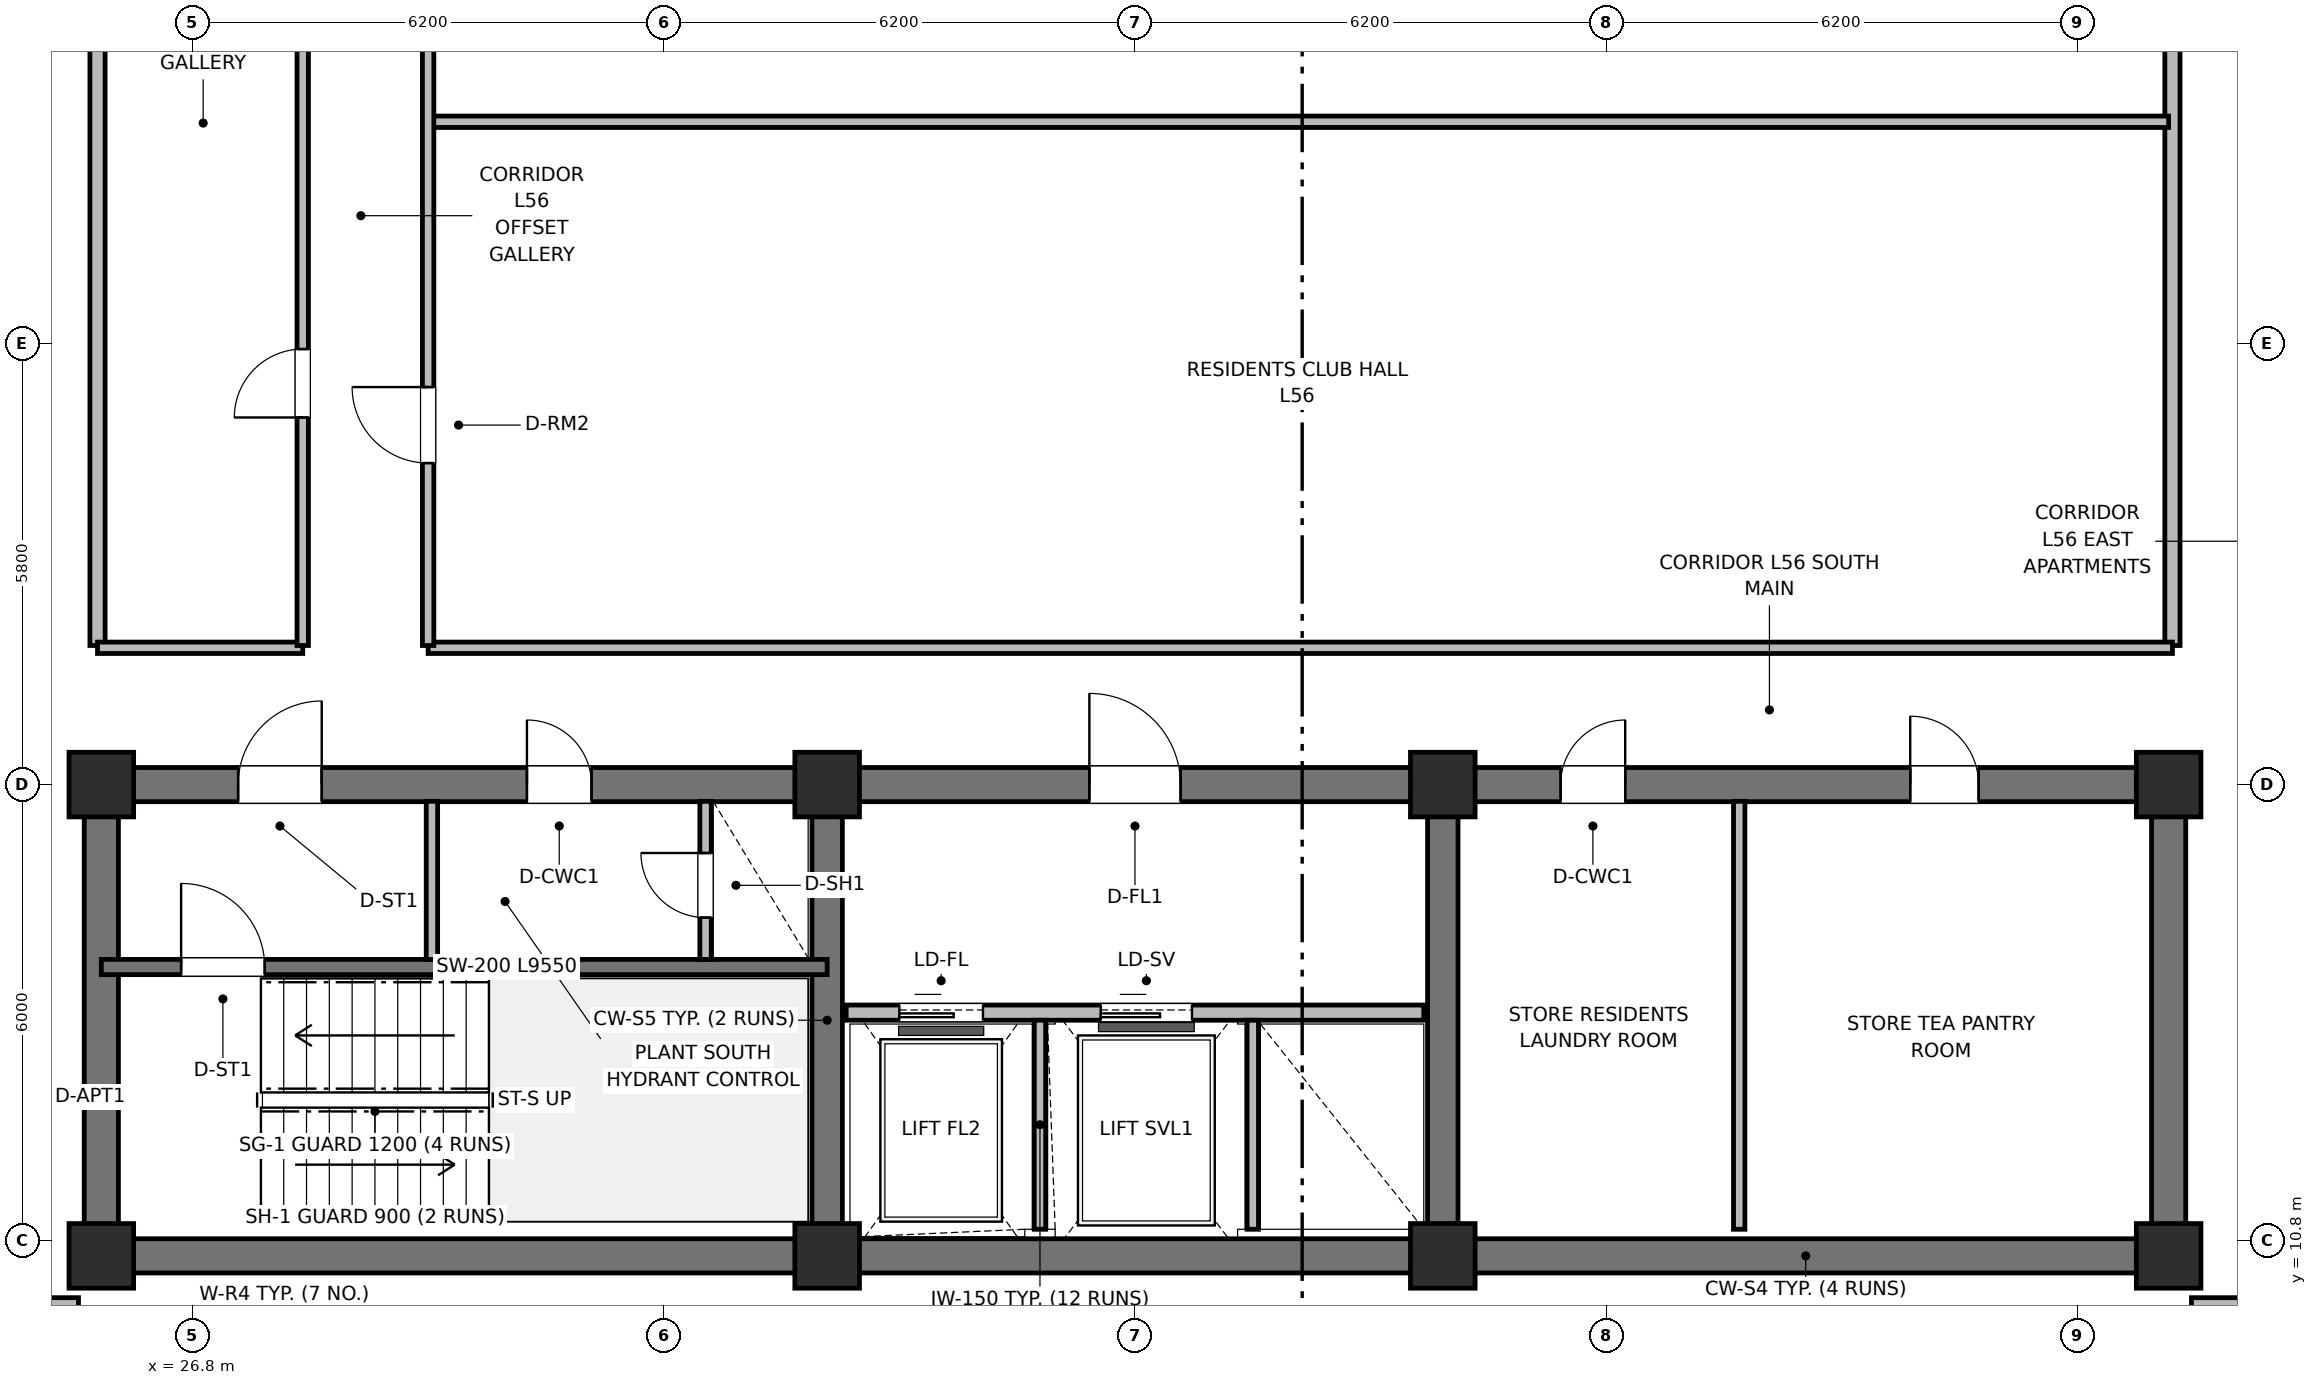
"""IFC4 building model, lengths in metres.
Left out: names, types, materials, properties, quantities, classifications, styles, units other than length and angle.
Written with IfcOpenShell. Run it as: python <this file> out.ifc"""

import sys

from ifc_helpers import new_model, si_unit, direction, frame, frame_2d, origin, origin_2d, place, context, subcontext, project, spatial, rectangle, extrude, element, fill, save


model = new_model("IFC4")
c1 = context("Model", 3, precision=1e-05, world=origin(), true_north=direction((0.0, 1.0)))
c2 = subcontext(c1, "Body", "Model", "MODEL_VIEW")
j1 = project(units=[si_unit("LENGTHUNIT", "METRE"), si_unit("PLANEANGLEUNIT", "RADIAN")], contexts=[c1])
p1 = place(None, origin())
s1 = spatial("IfcSite", under=j1, at=p1, CompositionType="ELEMENT")
p2 = place(p1, origin())
s2 = spatial("IfcBuilding", under=s1, at=p2, CompositionType="ELEMENT")
p3 = place(p2, frame((0.0, 0.0, 225.8)))
s3 = spatial("IfcBuildingStorey", under=s2, at=p3, CompositionType="ELEMENT", Elevation=225.8)
p4 = place(p3, frame((52.8, 10.6, 0.0), z_axis=(0.0, 0.0, 1.0), x_axis=(-1.0, 0.0, 0.0)))
e1 = element("IfcWall", 1, at=p4, inside=s3, PredefinedType="SHEAR", context=c2, shape_type="SweptSolid", body=[
    extrude(rectangle(XDim=27.2, YDim=0.45, at=frame_2d((13.6, 0.0))), origin(), (0.0, 0.0, 1.0), 3.7),
])
for number, where, z_axis, x_axis in (
    (2, (25.6, 10.825, 0.0), (0.0, 0.0, 1.0), (0.0, 1.0, 0.0)),
    (3, (52.8, 10.825, 0.0), (0.0, 0.0, 1.0), (0.0, 1.0, 0.0)),
):
    element("IfcWall", number, at=place(p3, frame(where, z_axis=z_axis, x_axis=x_axis)), inside=s3, PredefinedType="SHEAR", context=c2, shape_type="SweptSolid", body=[
        extrude(rectangle(XDim=5.75, YDim=0.45, at=frame_2d((2.875, 0.0))), origin(), (0.0, 0.0, 1.0), 3.7),
    ])
p5 = place(p3, frame((25.6, 16.8, 0.0), z_axis=(0.0, 0.0, 1.0), x_axis=(1.0, 0.0, 0.0)))
e4 = element("IfcWall", 4, at=p5, inside=s3, PredefinedType="SHEAR", context=c2, shape_type="SweptSolid", body=[
    extrude(rectangle(XDim=27.2, YDim=0.45, at=frame_2d((13.6, 0.0))), origin(), (0.0, 0.0, 1.0), 3.7),
])
p6 = place(p5, frame((1.8, 0.0, 0.0)))
e5 = element("IfcOpeningElement", 5, at=p6, cuts=e4, PredefinedType="OPENING", context=c2, shape_type="SweptSolid", body=[
    extrude(rectangle(XDim=1.1, YDim=2.15, at=frame_2d((0.55, 1.075))), frame((0.0, 0.235, 0.0), z_axis=(0.0, -1.0, 0.0), x_axis=(1.0, 0.0, 0.0)), (0.0, 0.0, 1.0), 0.47),
])
p7 = place(p5, frame((5.6, 0.0, 0.0)))
e6 = element("IfcOpeningElement", 6, at=p7, cuts=e4, PredefinedType="OPENING", context=c2, shape_type="SweptSolid", body=[
    extrude(rectangle(XDim=0.85, YDim=2.1, at=frame_2d((0.425, 1.05))), frame((0.0, 0.235, 0.0), z_axis=(0.0, -1.0, 0.0), x_axis=(1.0, 0.0, 0.0)), (0.0, 0.0, 1.0), 0.47),
])
p8 = place(p5, frame((13.0, 0.0, 0.0)))
e7 = element("IfcOpeningElement", 7, at=p8, cuts=e4, PredefinedType="OPENING", context=c2, shape_type="SweptSolid", body=[
    extrude(rectangle(XDim=1.2, YDim=2.15, at=frame_2d((0.6, 1.075))), frame((0.0, 0.235, 0.0), z_axis=(0.0, -1.0, 0.0), x_axis=(1.0, 0.0, 0.0)), (0.0, 0.0, 1.0), 0.47),
])
p9 = place(p5, frame((19.2, 0.0, 0.0)))
e8 = element("IfcOpeningElement", 8, at=p9, cuts=e4, PredefinedType="OPENING", context=c2, shape_type="SweptSolid", body=[
    extrude(rectangle(XDim=0.85, YDim=2.1, at=frame_2d((0.425, 1.05))), frame((0.0, 0.235, 0.0), z_axis=(0.0, -1.0, 0.0), x_axis=(1.0, 0.0, 0.0)), (0.0, 0.0, 1.0), 0.47),
])
p10 = place(p5, frame((23.8, 0.0, 0.0)))
e9 = element("IfcOpeningElement", 9, at=p10, cuts=e4, PredefinedType="OPENING", context=c2, shape_type="SweptSolid", body=[
    extrude(rectangle(XDim=0.9, YDim=2.1, at=frame_2d((0.45, 1.05))), frame((0.0, 0.235, 0.0), z_axis=(0.0, -1.0, 0.0), x_axis=(1.0, 0.0, 0.0)), (0.0, 0.0, 1.0), 0.47),
])
for number, where, z_axis, x_axis in (
    (10, (35.15, 10.825, 0.0), (0.0, 0.0, 1.0), (0.0, 1.0, 0.0)),
    (11, (43.25, 10.825, 0.0), (0.0, 0.0, 1.0), (0.0, 1.0, 0.0)),
):
    element("IfcWall", number, at=place(p3, frame(where, z_axis=z_axis, x_axis=x_axis)), inside=s3, PredefinedType="SHEAR", context=c2, shape_type="SweptSolid", body=[
        extrude(rectangle(XDim=5.75, YDim=0.4, at=frame_2d((2.875, 0.0))), origin(), (0.0, 0.0, 1.0), 3.7),
    ])
for number, where, z_axis, x_axis in (
    (12, (25.6, 10.6, 0.0), (0.0, 0.0, 1.0), (1.0, 0.0, 0.0)),
    (13, (25.6, 16.8, 0.0), (0.0, 0.0, 1.0), (1.0, 0.0, 0.0)),
    (14, (35.15, 10.6, 0.0), (0.0, 0.0, 1.0), (1.0, 0.0, 0.0)),
    (15, (35.15, 16.8, 0.0), (0.0, 0.0, 1.0), (1.0, 0.0, 0.0)),
    (16, (43.25, 10.6, 0.0), (0.0, 0.0, 1.0), (1.0, 0.0, 0.0)),
    (17, (43.25, 16.8, 0.0), (0.0, 0.0, 1.0), (1.0, 0.0, 0.0)),
    (18, (52.8, 10.6, 0.0), (0.0, 0.0, 1.0), (1.0, 0.0, 0.0)),
    (19, (52.8, 16.8, 0.0), (0.0, 0.0, 1.0), (1.0, 0.0, 0.0)),
):
    element("IfcColumn", number, at=place(p3, frame(where, z_axis=z_axis, x_axis=x_axis)), inside=s3, PredefinedType="COLUMN", context=c2, shape_type="SweptSolid", body=[
        extrude(rectangle(XDim=0.85, YDim=0.85, at=origin_2d()), origin(), (0.0, 0.0, 1.0), 3.7),
    ])
p11 = place(p3, frame((25.6, 14.4, 0.0), z_axis=(0.0, 0.0, 1.0), x_axis=(1.0, 0.0, 0.0)))
e20 = element("IfcWall", 20, at=p11, inside=s3, PredefinedType="SHEAR", context=c2, shape_type="SweptSolid", body=[
    extrude(rectangle(XDim=9.55, YDim=0.2, at=frame_2d((4.775, 0.0))), origin(), (0.0, 0.0, 1.0), 3.7),
])
p12 = place(p11, frame((1.05, 0.0, 0.0)))
e21 = element("IfcOpeningElement", 21, at=p12, cuts=e20, PredefinedType="OPENING", context=c2, shape_type="SweptSolid", body=[
    extrude(rectangle(XDim=1.1, YDim=2.15, at=frame_2d((0.55, 1.075))), frame((0.0, 0.11, 0.0), z_axis=(0.0, -1.0, 0.0), x_axis=(1.0, 0.0, 0.0)), (0.0, 0.0, 1.0), 0.22),
])
p13 = place(p3, frame((29.95, 14.5, 0.0), z_axis=(0.0, 0.0, 1.0), x_axis=(0.0, 1.0, 0.0)))
e22 = element("IfcWall", 22, at=p13, inside=s3, PredefinedType="PARTITIONING", context=c2, shape_type="SweptSolid", body=[
    extrude(rectangle(XDim=2.08, YDim=0.15, at=frame_2d((1.04, 0.0))), origin(), (0.0, 0.0, 1.0), 2.56),
])
p14 = place(p3, frame((33.55, 14.5, 0.0), z_axis=(0.0, 0.0, 1.0), x_axis=(0.0, 1.0, 0.0)))
e23 = element("IfcWall", 23, at=p14, inside=s3, PredefinedType="PARTITIONING", context=c2, shape_type="SweptSolid", body=[
    extrude(rectangle(XDim=2.08, YDim=0.15, at=frame_2d((1.04, 0.0))), origin(), (0.0, 0.0, 1.0), 2.56),
])
p15 = place(p14, frame((0.55, 0.0, 0.0)))
e24 = element("IfcOpeningElement", 24, at=p15, cuts=e23, PredefinedType="OPENING", context=c2, shape_type="SweptSolid", body=[
    extrude(rectangle(XDim=0.85, YDim=2.05, at=frame_2d((0.425, 1.025))), frame((0.0, 0.085, 0.0), z_axis=(0.0, -1.0, 0.0), x_axis=(1.0, 0.0, 0.0)), (0.0, 0.0, 1.0), 0.17),
])
p16 = place(p3, frame((35.4, 13.8, 0.0), z_axis=(0.0, 0.0, 1.0), x_axis=(1.0, 0.0, 0.0)))
e25 = element("IfcWall", 25, at=p16, inside=s3, PredefinedType="PARTITIONING", context=c2, shape_type="SweptSolid", body=[
    extrude(rectangle(XDim=7.6, YDim=0.2, at=frame_2d((3.8, 0.0))), origin(), (0.0, 0.0, 1.0), 2.33),
])
p17 = place(p16, frame((0.7, 0.0, 0.0)))
e26 = element("IfcOpeningElement", 26, at=p17, cuts=e25, PredefinedType="OPENING", context=c2, shape_type="SweptSolid", body=[
    extrude(rectangle(XDim=1.1, YDim=2.15, at=frame_2d((0.55, 1.075))), frame((0.0, 0.11, 0.0), z_axis=(0.0, -1.0, 0.0), x_axis=(1.0, 0.0, 0.0)), (0.0, 0.0, 1.0), 0.22),
])
p18 = place(p16, frame((3.35, 0.0, 0.0)))
e27 = element("IfcOpeningElement", 27, at=p18, cuts=e25, PredefinedType="OPENING", context=c2, shape_type="SweptSolid", body=[
    extrude(rectangle(XDim=1.2, YDim=2.15, at=frame_2d((0.6, 1.075))), frame((0.0, 0.11, 0.0), z_axis=(0.0, -1.0, 0.0), x_axis=(1.0, 0.0, 0.0)), (0.0, 0.0, 1.0), 0.22),
])
for number, where, z_axis, x_axis in (
    (28, (37.95, 10.95, 0.0), (0.0, 0.0, 1.0), (0.0, 1.0, 0.0)),
    (29, (40.75, 10.95, 0.0), (0.0, 0.0, 1.0), (0.0, 1.0, 0.0)),
):
    element("IfcWall", number, at=place(p3, frame(where, z_axis=z_axis, x_axis=x_axis)), inside=s3, PredefinedType="PARTITIONING", context=c2, shape_type="SweptSolid", body=[
        extrude(rectangle(XDim=2.75, YDim=0.15, at=frame_2d((1.375, 0.0))), origin(), (0.0, 0.0, 1.0), 2.56),
    ])
p19 = place(p3, frame((47.15, 10.95, 0.0), z_axis=(0.0, 0.0, 1.0), x_axis=(0.0, 1.0, 0.0)))
e30 = element("IfcWall", 30, at=p19, inside=s3, PredefinedType="PARTITIONING", context=c2, shape_type="SweptSolid", body=[
    extrude(rectangle(XDim=5.63, YDim=0.15, at=frame_2d((2.815, 0.0))), origin(), (0.0, 0.0, 1.0), 2.56),
])
for number, where, z_axis, x_axis in (
    (31, (25.55, 18.63, 0.0), (0.0, 0.0, 1.0), (0.0, 1.0, 0.0)),
    (32, (52.85, 18.63, 0.0), (0.0, 0.0, 1.0), (0.0, 1.0, 0.0)),
):
    element("IfcWall", number, at=place(p3, frame(where, z_axis=z_axis, x_axis=x_axis)), inside=s3, PredefinedType="PARTITIONING", context=c2, shape_type="SweptSolid", body=[
        extrude(rectangle(XDim=19.14, YDim=0.2, at=frame_2d((9.57, 0.0))), origin(), (0.0, 0.0, 1.0), 2.56),
    ])
p20 = place(p3, frame((25.55, 18.6, 0.0), z_axis=(0.0, 0.0, 1.0), x_axis=(1.0, 0.0, 0.0)))
e33 = element("IfcWall", 33, at=p20, inside=s3, PredefinedType="PARTITIONING", context=c2, shape_type="SweptSolid", body=[
    extrude(rectangle(XDim=2.7, YDim=0.15, at=frame_2d((1.35, 0.0))), origin(), (0.0, 0.0, 1.0), 2.56),
])
p21 = place(p3, frame((29.9, 18.6, 0.0), z_axis=(0.0, 0.0, 1.0), x_axis=(1.0, 0.0, 0.0)))
e34 = element("IfcWall", 34, at=p21, inside=s3, PredefinedType="PARTITIONING", context=c2, shape_type="SweptSolid", body=[
    extrude(rectangle(XDim=22.95, YDim=0.15, at=frame_2d((11.475, 0.0))), origin(), (0.0, 0.0, 1.0), 2.56),
])
p22 = place(p3, frame((29.93, 25.521, 0.0), z_axis=(0.0, 0.0, 1.0), x_axis=(1.0, 0.0, 0.0)))
e35 = element("IfcWall", 35, at=p22, inside=s3, PredefinedType="PARTITIONING", context=c2, shape_type="SweptSolid", body=[
    extrude(rectangle(XDim=22.87, YDim=0.15, at=frame_2d((11.435, 0.0))), origin(), (0.0, 0.0, 1.0), 2.56),
])
p23 = place(p3, frame((28.25, 18.63, 0.0), z_axis=(0.0, 0.0, 1.0), x_axis=(0.0, 1.0, 0.0)))
e36 = element("IfcWall", 36, at=p23, inside=s3, PredefinedType="PARTITIONING", context=c2, shape_type="SweptSolid", body=[
    extrude(rectangle(XDim=19.14, YDim=0.15, at=frame_2d((9.57, 0.0))), origin(), (0.0, 0.0, 1.0), 2.56),
])
p24 = place(p23, frame((3.0, 0.0, 0.0)))
e37 = element("IfcOpeningElement", 37, at=p24, cuts=e36, PredefinedType="OPENING", context=c2, shape_type="SweptSolid", body=[
    extrude(rectangle(XDim=0.9, YDim=2.1, at=frame_2d((0.45, 1.05))), frame((0.0, 0.085, 0.0), z_axis=(0.0, -1.0, 0.0), x_axis=(1.0, 0.0, 0.0)), (0.0, 0.0, 1.0), 0.17),
])
p25 = place(p23, frame((11.5, 0.0, 0.0)))
e38 = element("IfcOpeningElement", 38, at=p25, cuts=e36, PredefinedType="OPENING", context=c2, shape_type="SweptSolid", body=[
    extrude(rectangle(XDim=0.9, YDim=2.1, at=frame_2d((0.45, 1.05))), frame((0.0, 0.085, 0.0), z_axis=(0.0, -1.0, 0.0), x_axis=(1.0, 0.0, 0.0)), (0.0, 0.0, 1.0), 0.17),
])
p26 = place(p3, frame((29.9, 18.63, 0.0), z_axis=(0.0, 0.0, 1.0), x_axis=(0.0, 1.0, 0.0)))
e39 = element("IfcWall", 39, at=p26, inside=s3, PredefinedType="PARTITIONING", context=c2, shape_type="SweptSolid", body=[
    extrude(rectangle(XDim=19.14, YDim=0.15, at=frame_2d((9.57, 0.0))), origin(), (0.0, 0.0, 1.0), 2.56),
])
p27 = place(p26, frame((2.4, 0.0, 0.0)))
e40 = element("IfcOpeningElement", 40, at=p27, cuts=e39, PredefinedType="OPENING", context=c2, shape_type="SweptSolid", body=[
    extrude(rectangle(XDim=1.0, YDim=2.15, at=frame_2d((0.5, 1.075))), frame((0.0, 0.085, 0.0), z_axis=(0.0, -1.0, 0.0), x_axis=(1.0, 0.0, 0.0)), (0.0, 0.0, 1.0), 0.17),
])
p28 = place(p26, frame((8.89, 0.0, 0.0)))
e41 = element("IfcOpeningElement", 41, at=p28, cuts=e39, PredefinedType="OPENING", context=c2, shape_type="SweptSolid", body=[
    extrude(rectangle(XDim=1.0, YDim=2.15, at=frame_2d((0.5, 1.075))), frame((0.0, 0.085, 0.0), z_axis=(0.0, -1.0, 0.0), x_axis=(1.0, 0.0, 0.0)), (0.0, 0.0, 1.0), 0.17),
])
p29 = place(p3, frame((21.546, 9.95, 0.0), z_axis=(0.0, 0.0, 1.0), x_axis=(1.0, 0.0, 0.0)))
e42 = element("IfcWall", 42, at=p29, inside=s3, PredefinedType="PARTITIONING", context=c2, shape_type="SweptSolid", body=[
    extrude(rectangle(XDim=3.754, YDim=0.2, at=frame_2d((1.877, 0.0))), origin(), (0.0, 0.0, 1.0), 2.56),
])
p30 = place(p3, frame((53.1, 9.95, 0.0), z_axis=(0.0, 0.0, 1.0), x_axis=(1.0, 0.0, 0.0)))
e43 = element("IfcWall", 43, at=p30, inside=s3, PredefinedType="PARTITIONING", context=c2, shape_type="SweptSolid", body=[
    extrude(rectangle(XDim=3.754, YDim=0.2, at=frame_2d((1.877, 0.0))), origin(), (0.0, 0.0, 1.0), 2.56),
])
p31 = place(p12, origin())
e44 = element("IfcDoor", 44, at=p31, inside=s3, OperationType="SINGLE_SWING_LEFT", PredefinedType="DOOR", context=c2, shape_type="SweptSolid", body=[
    extrude(rectangle(XDim=1.1, YDim=2.15, at=frame_2d((0.55, 1.075))), frame((0.0, 0.025, 0.0), z_axis=(0.0, -1.0, 0.0), x_axis=(1.0, 0.0, 0.0)), (0.0, 0.0, 1.0), 0.05),
])
fill(e21, e44)
p32 = place(p15, origin())
e45 = element("IfcDoor", 45, at=p32, inside=s3, OperationType="SINGLE_SWING_RIGHT", PredefinedType="TRAPDOOR", context=c2, shape_type="SweptSolid", body=[
    extrude(rectangle(XDim=0.85, YDim=2.05, at=frame_2d((0.425, 1.025))), frame((0.0, 0.025, 0.0), z_axis=(0.0, -1.0, 0.0), x_axis=(1.0, 0.0, 0.0)), (0.0, 0.0, 1.0), 0.05),
])
fill(e24, e45)
p33 = place(p17, origin())
e46 = element("IfcDoor", 46, at=p33, inside=s3, OperationType="SLIDING_TO_LEFT", PredefinedType="DOOR", context=c2, shape_type="SweptSolid", body=[
    extrude(rectangle(XDim=1.1, YDim=2.15, at=frame_2d((0.55, 1.075))), frame((0.0, 0.025, 0.0), z_axis=(0.0, -1.0, 0.0), x_axis=(1.0, 0.0, 0.0)), (0.0, 0.0, 1.0), 0.05),
])
fill(e26, e46)
p34 = place(p18, origin())
e47 = element("IfcDoor", 47, at=p34, inside=s3, OperationType="SLIDING_TO_LEFT", PredefinedType="DOOR", context=c2, shape_type="SweptSolid", body=[
    extrude(rectangle(XDim=1.2, YDim=2.15, at=frame_2d((0.6, 1.075))), frame((0.0, 0.025, 0.0), z_axis=(0.0, -1.0, 0.0), x_axis=(1.0, 0.0, 0.0)), (0.0, 0.0, 1.0), 0.05),
])
fill(e27, e47)
p35 = place(p24, origin())
e48 = element("IfcDoor", 48, at=p35, inside=s3, OperationType="SINGLE_SWING_LEFT", PredefinedType="DOOR", context=c2, shape_type="SweptSolid", body=[
    extrude(rectangle(XDim=0.9, YDim=2.1, at=frame_2d((0.45, 1.05))), frame((0.0, 0.025, 0.0), z_axis=(0.0, -1.0, 0.0), x_axis=(1.0, 0.0, 0.0)), (0.0, 0.0, 1.0), 0.05),
])
fill(e37, e48)
p36 = place(p27, origin())
e49 = element("IfcDoor", 49, at=p36, inside=s3, OperationType="SINGLE_SWING_RIGHT", PredefinedType="DOOR", context=c2, shape_type="SweptSolid", body=[
    extrude(rectangle(XDim=1.0, YDim=2.15, at=frame_2d((0.5, 1.075))), frame((0.0, 0.025, 0.0), z_axis=(0.0, -1.0, 0.0), x_axis=(1.0, 0.0, 0.0)), (0.0, 0.0, 1.0), 0.05),
])
fill(e40, e49)
p37 = place(p6, origin())
e50 = element("IfcDoor", 50, at=p37, inside=s3, OperationType="SINGLE_SWING_RIGHT", PredefinedType="DOOR", context=c2, shape_type="SweptSolid", body=[
    extrude(rectangle(XDim=1.1, YDim=2.15, at=frame_2d((0.55, 1.075))), frame((0.0, 0.025, 0.0), z_axis=(0.0, -1.0, 0.0), x_axis=(1.0, 0.0, 0.0)), (0.0, 0.0, 1.0), 0.05),
])
fill(e5, e50)
p38 = place(p7, origin())
e51 = element("IfcDoor", 51, at=p38, inside=s3, OperationType="SINGLE_SWING_LEFT", PredefinedType="DOOR", context=c2, shape_type="SweptSolid", body=[
    extrude(rectangle(XDim=0.85, YDim=2.1, at=frame_2d((0.425, 1.05))), frame((0.0, 0.025, 0.0), z_axis=(0.0, -1.0, 0.0), x_axis=(1.0, 0.0, 0.0)), (0.0, 0.0, 1.0), 0.05),
])
fill(e6, e51)
p39 = place(p8, origin())
e52 = element("IfcDoor", 52, at=p39, inside=s3, OperationType="SINGLE_SWING_LEFT", PredefinedType="DOOR", context=c2, shape_type="SweptSolid", body=[
    extrude(rectangle(XDim=1.2, YDim=2.15, at=frame_2d((0.6, 1.075))), frame((0.0, 0.025, 0.0), z_axis=(0.0, -1.0, 0.0), x_axis=(1.0, 0.0, 0.0)), (0.0, 0.0, 1.0), 0.05),
])
fill(e7, e52)
p40 = place(p9, origin())
e53 = element("IfcDoor", 53, at=p40, inside=s3, OperationType="SINGLE_SWING_RIGHT", PredefinedType="DOOR", context=c2, shape_type="SweptSolid", body=[
    extrude(rectangle(XDim=0.85, YDim=2.1, at=frame_2d((0.425, 1.05))), frame((0.0, 0.025, 0.0), z_axis=(0.0, -1.0, 0.0), x_axis=(1.0, 0.0, 0.0)), (0.0, 0.0, 1.0), 0.05),
])
fill(e8, e53)
p41 = place(p10, origin())
e54 = element("IfcDoor", 54, at=p41, inside=s3, OperationType="SINGLE_SWING_LEFT", PredefinedType="DOOR", context=c2, shape_type="SweptSolid", body=[
    extrude(rectangle(XDim=0.9, YDim=2.1, at=frame_2d((0.45, 1.05))), frame((0.0, 0.025, 0.0), z_axis=(0.0, -1.0, 0.0), x_axis=(1.0, 0.0, 0.0)), (0.0, 0.0, 1.0), 0.05),
])
fill(e9, e54)
save(model, sys.argv[1])
